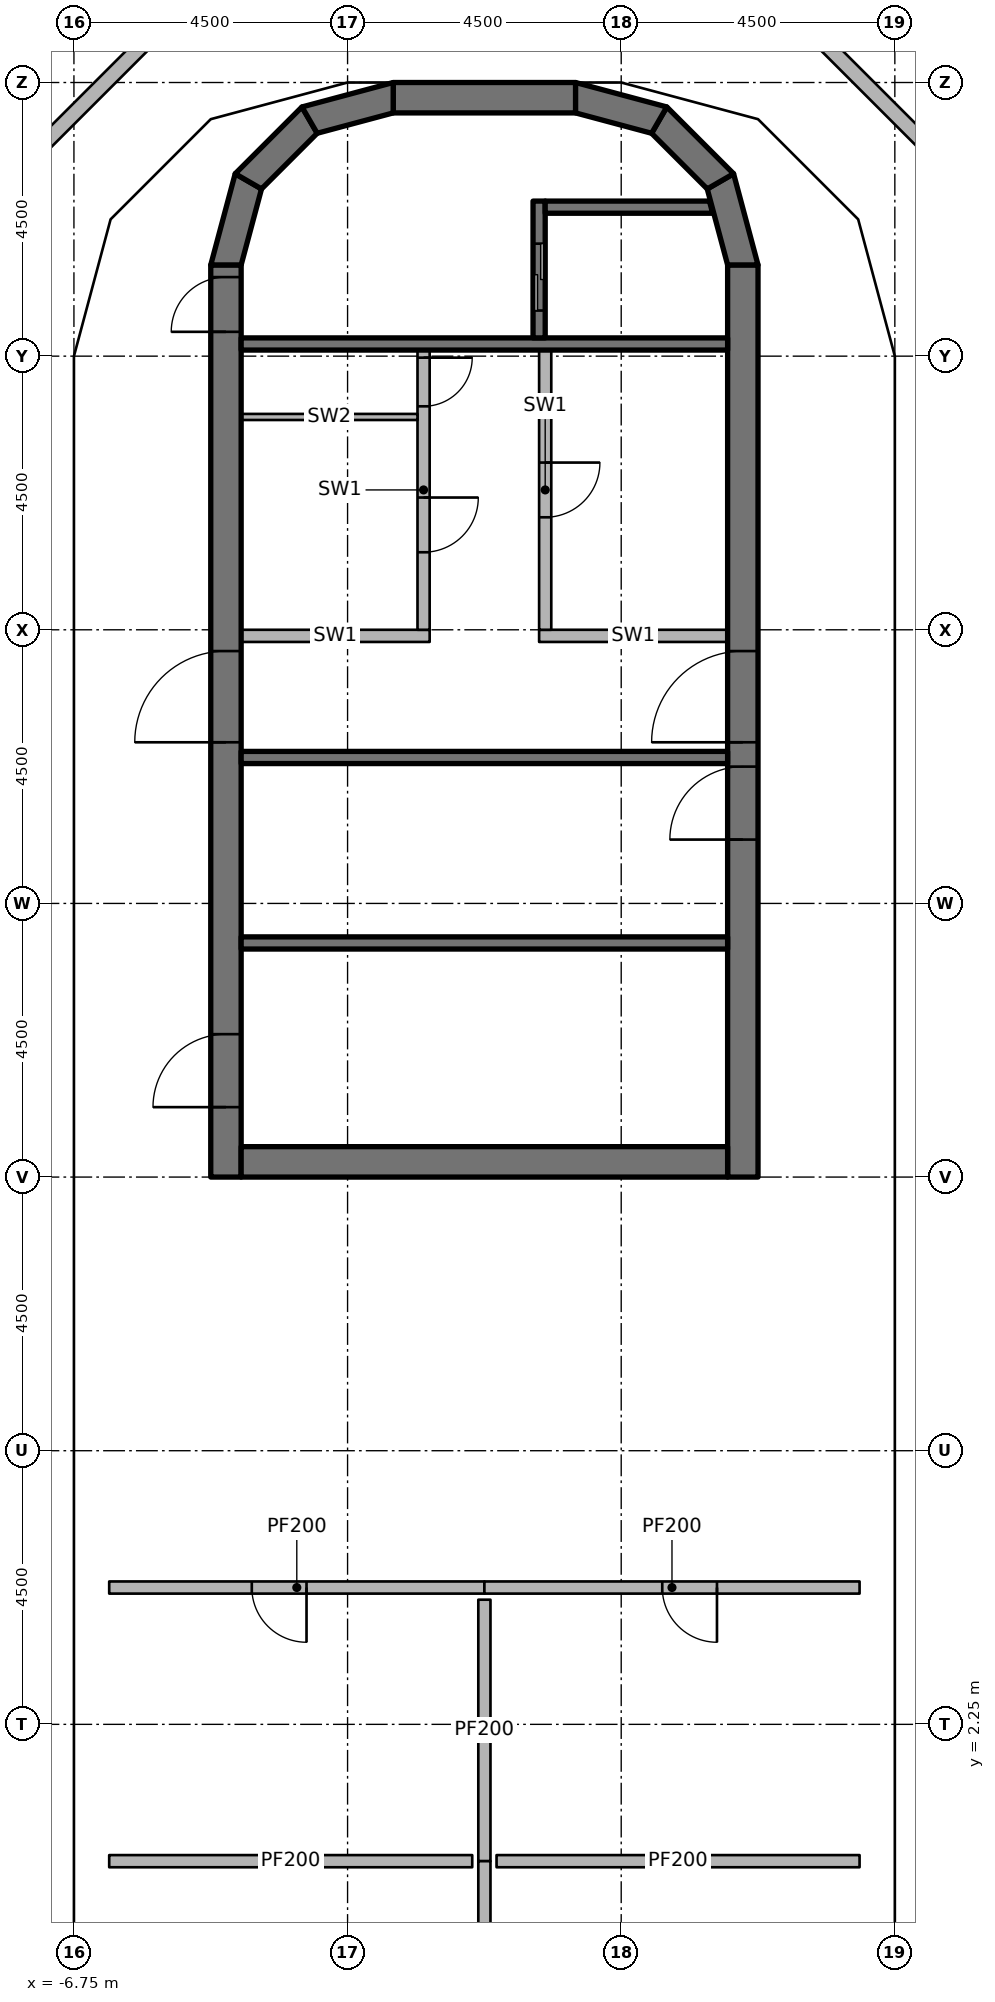
"""IFC4 building model, lengths in metres.
Left out: names, types, materials, properties, quantities, classifications, styles, units other than length and angle.
Written with IfcOpenShell. Run it as: python <this file> out.ifc"""

import sys

from ifc_helpers import new_model, si_unit, direction, frame, frame_2d, origin, origin_2d, place, context, subcontext, project, spatial, polyline, rectangle, outline, extrude, element, fill, save


model = new_model("IFC4")
c1 = context("Model", 3, precision=1e-05, world=origin(), true_north=direction((0.0, 1.0)))
c2 = subcontext(c1, "Body", "Model", "MODEL_VIEW")
j1 = project(units=[si_unit("LENGTHUNIT", "METRE"), si_unit("PLANEANGLEUNIT", "RADIAN")], contexts=[c1])
p1 = place(None, origin())
s1 = spatial("IfcSite", under=j1, at=p1, CompositionType="ELEMENT")
p2 = place(p1, origin())
s2 = spatial("IfcBuilding", under=s1, at=p2, CompositionType="ELEMENT")
p3 = place(p2, frame((0.0, 0.0, 309.6)))
s3 = spatial("IfcBuildingStorey", under=s2, at=p3, CompositionType="ELEMENT", Elevation=309.6)
for number, where, z_axis, x_axis in (
    (1, (-6.25, 6.25, 0.0), (0.0, 0.0, 1.0), (1.0, 0.0, 0.0)),
    (2, (-6.25, 10.75, 0.0), (0.0, 0.0, 1.0), (1.0, 0.0, 0.0)),
    (3, (-6.25, 15.75, 0.0), (0.0, 0.0, 1.0), (1.0, 0.0, 0.0)),
    (4, (-6.25, 20.25, 0.0), (0.0, 0.0, 1.0), (1.0, 0.0, 0.0)),
    (5, (-6.25, 24.65, 0.0), (0.0, 0.0, 1.0), (1.0, 0.0, 0.0)),
    (6, (6.25, 6.25, 0.0), (0.0, 0.0, 1.0), (1.0, 0.0, 0.0)),
    (7, (6.25, 10.75, 0.0), (0.0, 0.0, 1.0), (1.0, 0.0, 0.0)),
    (8, (6.25, 15.75, 0.0), (0.0, 0.0, 1.0), (1.0, 0.0, 0.0)),
    (9, (6.25, 20.25, 0.0), (0.0, 0.0, 1.0), (1.0, 0.0, 0.0)),
    (10, (6.25, 24.65, 0.0), (0.0, 0.0, 1.0), (1.0, 0.0, 0.0)),
):
    element("IfcColumn", number, at=place(p3, frame(where, z_axis=z_axis, x_axis=x_axis)), inside=s3, PredefinedType="COLUMN", context=c2, shape_type="SweptSolid", body=[
        extrude(rectangle(XDim=0.6, YDim=0.6, at=origin_2d()), origin(), (0.0, 0.0, 1.0), 3.45),
    ])
p4 = place(p3, frame((-4.25, 11.25, 0.0), z_axis=(0.0, 0.0, 1.0), x_axis=(0.0, 1.0, 0.0)))
e11 = element("IfcWall", 11, at=p4, inside=s3, PredefinedType="SHEAR", context=c2, shape_type="SweptSolid", body=[
    extrude(rectangle(XDim=15.0, YDim=0.5, at=frame_2d((7.5, 0.0))), origin(), (0.0, 0.0, 1.0), 3.6),
])
p5 = place(p4, frame((7.15, 0.0, 0.0)))
e12 = element("IfcOpeningElement", 12, at=p5, cuts=e11, PredefinedType="OPENING", context=c2, shape_type="SweptSolid", body=[
    extrude(rectangle(XDim=1.5, YDim=2.3, at=frame_2d((0.75, 1.15))), frame((0.0, 0.26, 0.0), z_axis=(0.0, -1.0, 0.0), x_axis=(1.0, 0.0, 0.0)), (0.0, 0.0, 1.0), 0.52),
])
p6 = place(p4, frame((13.9, 0.0, 0.0)))
e13 = element("IfcOpeningElement", 13, at=p6, cuts=e11, PredefinedType="OPENING", context=c2, shape_type="SweptSolid", body=[
    extrude(rectangle(XDim=0.9, YDim=2.1, at=frame_2d((0.45, 1.05))), frame((0.0, 0.26, 0.0), z_axis=(0.0, -1.0, 0.0), x_axis=(1.0, 0.0, 0.0)), (0.0, 0.0, 1.0), 0.52),
])
p7 = place(p4, frame((1.15, 0.0, 0.0)))
e14 = element("IfcOpeningElement", 14, at=p7, cuts=e11, PredefinedType="OPENING", context=c2, shape_type="SweptSolid", body=[
    extrude(rectangle(XDim=1.2, YDim=2.1, at=frame_2d((0.6, 1.05))), frame((0.0, 0.26, 0.0), z_axis=(0.0, -1.0, 0.0), x_axis=(1.0, 0.0, 0.0)), (0.0, 0.0, 1.0), 0.52),
])
p8 = place(p3, frame((4.25, 11.25, 0.0), z_axis=(0.0, 0.0, 1.0), x_axis=(0.0, 1.0, 0.0)))
e15 = element("IfcWall", 15, at=p8, inside=s3, PredefinedType="SHEAR", context=c2, shape_type="SweptSolid", body=[
    extrude(rectangle(XDim=15.0, YDim=0.5, at=frame_2d((7.5, 0.0))), origin(), (0.0, 0.0, 1.0), 3.6),
])
p9 = place(p8, frame((7.15, 0.0, 0.0)))
e16 = element("IfcOpeningElement", 16, at=p9, cuts=e15, PredefinedType="OPENING", context=c2, shape_type="SweptSolid", body=[
    extrude(rectangle(XDim=1.5, YDim=2.3, at=frame_2d((0.75, 1.15))), frame((0.0, 0.26, 0.0), z_axis=(0.0, -1.0, 0.0), x_axis=(1.0, 0.0, 0.0)), (0.0, 0.0, 1.0), 0.52),
])
p10 = place(p8, frame((5.55, 0.0, 0.0)))
e17 = element("IfcOpeningElement", 17, at=p10, cuts=e15, PredefinedType="OPENING", context=c2, shape_type="SweptSolid", body=[
    extrude(rectangle(XDim=1.2, YDim=2.1, at=frame_2d((0.6, 1.05))), frame((0.0, 0.26, 0.0), z_axis=(0.0, -1.0, 0.0), x_axis=(1.0, 0.0, 0.0)), (0.0, 0.0, 1.0), 0.52),
])
p11 = place(p3, frame((-4.0, 11.5, 0.0), z_axis=(0.0, 0.0, 1.0), x_axis=(1.0, 0.0, 0.0)))
e18 = element("IfcWall", 18, at=p11, inside=s3, PredefinedType="SHEAR", context=c2, shape_type="SweptSolid", body=[
    extrude(rectangle(XDim=8.0, YDim=0.5, at=frame_2d((4.0, 0.0))), origin(), (0.0, 0.0, 1.0), 3.6),
])
p12 = place(p3, frame((-1.5, 29.0, 0.0), z_axis=(0.0, 0.0, 1.0), x_axis=(1.0, 0.0, 0.0)))
e19 = element("IfcWall", 19, at=p12, inside=s3, PredefinedType="SHEAR", context=c2, shape_type="SweptSolid", body=[
    extrude(rectangle(XDim=3.0, YDim=0.5, at=frame_2d((1.5, 0.0))), origin(), (0.0, 0.0, 1.0), 3.6),
])
p13 = place(p3, origin())
e20 = element("IfcWall", 20, at=p13, inside=s3, PredefinedType="SHEAR", context=c2, shape_type="SweptSolid", body=[
    extrude(outline(polyline([(-4.5, 26.25), (-4.098, 27.75), (-3.665, 27.5), (-4.0, 26.25), (-4.5, 26.25)])), origin(), (0.0, 0.0, 1.0), 3.6),
])
p14 = place(p3, origin())
e21 = element("IfcWall", 21, at=p14, inside=s3, PredefinedType="SHEAR", context=c2, shape_type="SweptSolid", body=[
    extrude(outline(polyline([(-4.098, 27.75), (-3.0, 28.848), (-2.75, 28.415), (-3.665, 27.5), (-4.098, 27.75)])), origin(), (0.0, 0.0, 1.0), 3.6),
])
p15 = place(p3, origin())
e22 = element("IfcWall", 22, at=p15, inside=s3, PredefinedType="SHEAR", context=c2, shape_type="SweptSolid", body=[
    extrude(outline(polyline([(-3.0, 28.848), (-1.5, 29.25), (-1.5, 28.75), (-2.75, 28.415), (-3.0, 28.848)])), origin(), (0.0, 0.0, 1.0), 3.6),
])
p16 = place(p3, origin())
e23 = element("IfcWall", 23, at=p16, inside=s3, PredefinedType="SHEAR", context=c2, shape_type="SweptSolid", body=[
    extrude(outline(polyline([(4.5, 26.25), (4.098, 27.75), (3.665, 27.5), (4.0, 26.25), (4.5, 26.25)])), origin(), (0.0, 0.0, 1.0), 3.6),
])
p17 = place(p3, origin())
e24 = element("IfcWall", 24, at=p17, inside=s3, PredefinedType="SHEAR", context=c2, shape_type="SweptSolid", body=[
    extrude(outline(polyline([(4.098, 27.75), (3.0, 28.848), (2.75, 28.415), (3.665, 27.5), (4.098, 27.75)])), origin(), (0.0, 0.0, 1.0), 3.6),
])
p18 = place(p3, origin())
e25 = element("IfcWall", 25, at=p18, inside=s3, PredefinedType="SHEAR", context=c2, shape_type="SweptSolid", body=[
    extrude(outline(polyline([(3.0, 28.848), (1.5, 29.25), (1.5, 28.75), (2.75, 28.415), (3.0, 28.848)])), origin(), (0.0, 0.0, 1.0), 3.6),
])
p19 = place(p3, origin())
e26 = element("IfcWall", 26, at=p19, inside=s3, PredefinedType="PARAPET", context=c2, shape_type="SweptSolid", body=[
    extrude(outline(polyline([(-7.743, 27.921), (-5.421, 30.243), (-5.292, 30.019), (-7.519, 27.792), (-7.743, 27.921)])), origin(), (0.0, 0.0, 1.0), 1.22),
])
p20 = place(p3, origin())
e27 = element("IfcWall", 27, at=p20, inside=s3, PredefinedType="PARAPET", context=c2, shape_type="SweptSolid", body=[
    extrude(outline(polyline([(5.421, 30.243), (7.743, 27.921), (7.519, 27.792), (5.292, 30.019), (5.421, 30.243)])), origin(), (0.0, 0.0, 1.0), 1.22),
])
p21 = place(p3, frame((-4.0, 24.95, 0.0), z_axis=(0.0, 0.0, 1.0), x_axis=(1.0, 0.0, 0.0)))
e28 = element("IfcWall", 28, at=p21, inside=s3, PredefinedType="SHEAR", context=c2, shape_type="SweptSolid", body=[
    extrude(rectangle(XDim=8.0, YDim=0.2, at=frame_2d((4.0, 0.0))), origin(), (0.0, 0.0, 1.0), 3.45),
])
p22 = place(p3, frame((0.9, 27.3, 0.0), z_axis=(0.0, 0.0, 1.0), x_axis=(0.0, -1.0, 0.0)))
e29 = element("IfcWall", 29, at=p22, inside=s3, PredefinedType="SHEAR", context=c2, shape_type="SweptSolid", body=[
    extrude(rectangle(XDim=2.25, YDim=0.2, at=frame_2d((1.125, 0.0))), origin(), (0.0, 0.0, 1.0), 3.45),
])
p23 = place(p22, frame((0.7, 0.0, 0.0)))
e30 = element("IfcOpeningElement", 30, at=p23, cuts=e29, PredefinedType="OPENING", context=c2, shape_type="SweptSolid", body=[
    extrude(rectangle(XDim=1.1, YDim=2.3, at=frame_2d((0.55, 1.15))), frame((0.0, 0.11, 0.0), z_axis=(0.0, -1.0, 0.0), x_axis=(1.0, 0.0, 0.0)), (0.0, 0.0, 1.0), 0.22),
])
p24 = place(p3, origin())
e31 = element("IfcWall", 31, at=p24, inside=s3, PredefinedType="SHEAR", context=c2, shape_type="SweptSolid", body=[
    extrude(outline(polyline([(1.0, 27.1), (3.755, 27.1), (3.701, 27.3), (1.0, 27.3), (1.0, 27.1)])), origin(), (0.0, 0.0, 1.0), 3.45),
])
for number, where, z_axis, x_axis in (
    (32, (-4.0, 18.15, 0.0), (0.0, 0.0, 1.0), (1.0, 0.0, 0.0)),
    (33, (-4.0, 15.1, 0.0), (0.0, 0.0, 1.0), (1.0, 0.0, 0.0)),
):
    element("IfcWall", number, at=place(p3, frame(where, z_axis=z_axis, x_axis=x_axis)), inside=s3, PredefinedType="SHEAR", context=c2, shape_type="SweptSolid", body=[
        extrude(rectangle(XDim=8.0, YDim=0.2, at=frame_2d((4.0, 0.0))), origin(), (0.0, 0.0, 1.0), 3.45),
    ])
p25 = place(p3, frame((-4.0, 20.15, 0.0), z_axis=(0.0, 0.0, 1.0), x_axis=(1.0, 0.0, 0.0)))
e34 = element("IfcWall", 34, at=p25, inside=s3, PredefinedType="PARTITIONING", context=c2, shape_type="SweptSolid", body=[
    extrude(rectangle(XDim=3.1, YDim=0.2, at=frame_2d((1.55, 0.0))), origin(), (0.0, 0.0, 1.0), 3.45),
])
p26 = place(p3, frame((-1.0, 24.85, 0.0), z_axis=(0.0, 0.0, 1.0), x_axis=(0.0, -1.0, 0.0)))
e35 = element("IfcWall", 35, at=p26, inside=s3, PredefinedType="PARTITIONING", context=c2, shape_type="SweptSolid", body=[
    extrude(rectangle(XDim=4.6, YDim=0.2, at=frame_2d((2.3, 0.0))), origin(), (0.0, 0.0, 1.0), 3.45),
])
p27 = place(p26, frame((0.125, 0.0, 0.0)))
e36 = element("IfcOpeningElement", 36, at=p27, cuts=e35, PredefinedType="OPENING", context=c2, shape_type="SweptSolid", body=[
    extrude(rectangle(XDim=0.8, YDim=2.1, at=frame_2d((0.4, 1.05))), frame((0.0, 0.11, 0.0), z_axis=(0.0, -1.0, 0.0), x_axis=(1.0, 0.0, 0.0)), (0.0, 0.0, 1.0), 0.22),
])
p28 = place(p26, frame((2.425, 0.0, 0.0)))
e37 = element("IfcOpeningElement", 37, at=p28, cuts=e35, PredefinedType="OPENING", context=c2, shape_type="SweptSolid", body=[
    extrude(rectangle(XDim=0.9, YDim=2.1, at=frame_2d((0.45, 1.05))), frame((0.0, 0.11, 0.0), z_axis=(0.0, -1.0, 0.0), x_axis=(1.0, 0.0, 0.0)), (0.0, 0.0, 1.0), 0.22),
])
p29 = place(p3, frame((0.9, 20.15, 0.0), z_axis=(0.0, 0.0, 1.0), x_axis=(1.0, 0.0, 0.0)))
e38 = element("IfcWall", 38, at=p29, inside=s3, PredefinedType="PARTITIONING", context=c2, shape_type="SweptSolid", body=[
    extrude(rectangle(XDim=3.1, YDim=0.2, at=frame_2d((1.55, 0.0))), origin(), (0.0, 0.0, 1.0), 3.45),
])
p30 = place(p3, frame((1.0, 24.85, 0.0), z_axis=(0.0, 0.0, 1.0), x_axis=(0.0, -1.0, 0.0)))
e39 = element("IfcWall", 39, at=p30, inside=s3, PredefinedType="PARTITIONING", context=c2, shape_type="SweptSolid", body=[
    extrude(rectangle(XDim=4.6, YDim=0.2, at=frame_2d((2.3, 0.0))), origin(), (0.0, 0.0, 1.0), 3.45),
])
p31 = place(p30, frame((1.85, 0.0, 0.0)))
e40 = element("IfcOpeningElement", 40, at=p31, cuts=e39, PredefinedType="OPENING", context=c2, shape_type="SweptSolid", body=[
    extrude(rectangle(XDim=0.9, YDim=2.1, at=frame_2d((0.45, 1.05))), frame((0.0, 0.11, 0.0), z_axis=(0.0, -1.0, 0.0), x_axis=(1.0, 0.0, 0.0)), (0.0, 0.0, 1.0), 0.22),
])
p32 = place(p3, frame((-4.0, 23.75, 0.0), z_axis=(0.0, 0.0, 1.0), x_axis=(1.0, 0.0, 0.0)))
e41 = element("IfcWall", 41, at=p32, inside=s3, PredefinedType="PARTITIONING", context=c2, shape_type="SweptSolid", body=[
    extrude(rectangle(XDim=2.9, YDim=0.1, at=frame_2d((1.45, 0.0))), origin(), (0.0, 0.0, 1.0), 3.45),
])
p33 = place(p3, frame((0.0, 4.5, 0.0), z_axis=(0.0, 0.0, 1.0), x_axis=(-1.0, 0.0, 0.0)))
e42 = element("IfcWall", 42, at=p33, inside=s3, PredefinedType="PARTITIONING", context=c2, shape_type="SweptSolid", body=[
    extrude(rectangle(XDim=6.17, YDim=0.2, at=frame_2d((3.085, 0.0))), origin(), (0.0, 0.0, 1.0), 2.51),
])
p34 = place(p33, frame((2.925, 0.0, 0.0)))
e43 = element("IfcOpeningElement", 43, at=p34, cuts=e42, PredefinedType="OPENING", context=c2, shape_type="SweptSolid", body=[
    extrude(rectangle(XDim=0.9, YDim=2.1, at=frame_2d((0.45, 1.05))), frame((0.0, 0.11, 0.0), z_axis=(0.0, -1.0, 0.0), x_axis=(1.0, 0.0, 0.0)), (0.0, 0.0, 1.0), 0.22),
])
p35 = place(p3, frame((6.17, 4.5, 0.0), z_axis=(0.0, 0.0, 1.0), x_axis=(-1.0, 0.0, 0.0)))
e44 = element("IfcWall", 44, at=p35, inside=s3, PredefinedType="PARTITIONING", context=c2, shape_type="SweptSolid", body=[
    extrude(rectangle(XDim=6.17, YDim=0.2, at=frame_2d((3.085, 0.0))), origin(), (0.0, 0.0, 1.0), 2.51),
])
p36 = place(p35, frame((2.345, 0.0, 0.0)))
e45 = element("IfcOpeningElement", 45, at=p36, cuts=e44, PredefinedType="OPENING", context=c2, shape_type="SweptSolid", body=[
    extrude(rectangle(XDim=0.9, YDim=2.1, at=frame_2d((0.45, 1.05))), frame((0.0, 0.11, 0.0), z_axis=(0.0, -1.0, 0.0), x_axis=(1.0, 0.0, 0.0)), (0.0, 0.0, 1.0), 0.22),
])
p37 = place(p3, frame((0.0, 4.3, 0.0), z_axis=(0.0, 0.0, 1.0), x_axis=(0.0, -1.0, 0.0)))
e46 = element("IfcWall", 46, at=p37, inside=s3, PredefinedType="PARTITIONING", context=c2, shape_type="SweptSolid", body=[
    extrude(rectangle(XDim=4.3, YDim=0.2, at=frame_2d((2.15, 0.0))), origin(), (0.0, 0.0, 1.0), 2.828),
])
for number, where, z_axis, x_axis in (
    (47, (-0.2, 0.0, 0.0), (0.0, 0.0, 1.0), (-1.0, 0.0, 0.0)),
    (48, (6.17, 0.0, 0.0), (0.0, 0.0, 1.0), (-1.0, 0.0, 0.0)),
):
    element("IfcWall", number, at=place(p3, frame(where, z_axis=z_axis, x_axis=x_axis)), inside=s3, PredefinedType="PARTITIONING", context=c2, shape_type="SweptSolid", body=[
        extrude(rectangle(XDim=5.97, YDim=0.2, at=frame_2d((2.985, 0.0))), origin(), (0.0, 0.0, 1.0), 2.51),
    ])
p38 = place(p3, frame((0.0, 0.0, 0.0), z_axis=(0.0, 0.0, 1.0), x_axis=(0.0, -1.0, 0.0)))
e49 = element("IfcWall", 49, at=p38, inside=s3, PredefinedType="PARTITIONING", context=c2, shape_type="SweptSolid", body=[
    extrude(rectangle(XDim=4.3, YDim=0.2, at=frame_2d((2.15, 0.0))), origin(), (0.0, 0.0, 1.0), 2.828),
])
p39 = place(p5, origin())
e50 = element("IfcDoor", 50, at=p39, inside=s3, OperationType="DOUBLE_DOOR_SINGLE_SWING", PredefinedType="DOOR", context=c2, shape_type="SweptSolid", body=[
    extrude(rectangle(XDim=1.5, YDim=2.3, at=frame_2d((0.75, 1.15))), frame((0.0, 0.025, 0.0), z_axis=(0.0, -1.0, 0.0), x_axis=(1.0, 0.0, 0.0)), (0.0, 0.0, 1.0), 0.05),
])
fill(e12, e50)
p40 = place(p9, origin())
e51 = element("IfcDoor", 51, at=p40, inside=s3, OperationType="DOUBLE_DOOR_SINGLE_SWING", PredefinedType="DOOR", context=c2, shape_type="SweptSolid", body=[
    extrude(rectangle(XDim=1.5, YDim=2.3, at=frame_2d((0.75, 1.15))), frame((0.0, 0.025, 0.0), z_axis=(0.0, -1.0, 0.0), x_axis=(1.0, 0.0, 0.0)), (0.0, 0.0, 1.0), 0.05),
])
fill(e16, e51)
p41 = place(p6, origin())
e52 = element("IfcDoor", 52, at=p41, inside=s3, OperationType="SINGLE_SWING_RIGHT", PredefinedType="DOOR", context=c2, shape_type="SweptSolid", body=[
    extrude(rectangle(XDim=0.9, YDim=2.1, at=frame_2d((0.45, 1.05))), frame((0.0, 0.025, 0.0), z_axis=(0.0, -1.0, 0.0), x_axis=(1.0, 0.0, 0.0)), (0.0, 0.0, 1.0), 0.05),
])
fill(e13, e52)
p42 = place(p10, origin())
e53 = element("IfcDoor", 53, at=p42, inside=s3, OperationType="SINGLE_SWING_RIGHT", PredefinedType="DOOR", context=c2, shape_type="SweptSolid", body=[
    extrude(rectangle(XDim=1.2, YDim=2.1, at=frame_2d((0.6, 1.05))), frame((0.0, 0.025, 0.0), z_axis=(0.0, -1.0, 0.0), x_axis=(1.0, 0.0, 0.0)), (0.0, 0.0, 1.0), 0.05),
])
fill(e17, e53)
p43 = place(p7, origin())
e54 = element("IfcDoor", 54, at=p43, inside=s3, OperationType="SINGLE_SWING_RIGHT", PredefinedType="DOOR", context=c2, shape_type="SweptSolid", body=[
    extrude(rectangle(XDim=1.2, YDim=2.1, at=frame_2d((0.6, 1.05))), frame((0.0, 0.025, 0.0), z_axis=(0.0, -1.0, 0.0), x_axis=(1.0, 0.0, 0.0)), (0.0, 0.0, 1.0), 0.05),
])
fill(e14, e54)
p44 = place(p23, origin())
e55 = element("IfcDoor", 55, at=p44, inside=s3, OperationType="DOUBLE_DOOR_SLIDING", PredefinedType="DOOR", context=c2, shape_type="SweptSolid", body=[
    extrude(rectangle(XDim=1.1, YDim=2.3, at=frame_2d((0.55, 1.15))), frame((0.0, 0.025, 0.0), z_axis=(0.0, -1.0, 0.0), x_axis=(1.0, 0.0, 0.0)), (0.0, 0.0, 1.0), 0.05),
])
fill(e30, e55)
p45 = place(p27, origin())
e56 = element("IfcDoor", 56, at=p45, inside=s3, OperationType="SINGLE_SWING_LEFT", PredefinedType="DOOR", context=c2, shape_type="SweptSolid", body=[
    extrude(rectangle(XDim=0.8, YDim=2.1, at=frame_2d((0.4, 1.05))), frame((0.0, 0.025, 0.0), z_axis=(0.0, -1.0, 0.0), x_axis=(1.0, 0.0, 0.0)), (0.0, 0.0, 1.0), 0.05),
])
fill(e36, e56)
p46 = place(p28, origin())
e57 = element("IfcDoor", 57, at=p46, inside=s3, OperationType="SINGLE_SWING_RIGHT", PredefinedType="DOOR", context=c2, shape_type="SweptSolid", body=[
    extrude(rectangle(XDim=0.9, YDim=2.1, at=frame_2d((0.45, 1.05))), frame((0.0, 0.025, 0.0), z_axis=(0.0, -1.0, 0.0), x_axis=(1.0, 0.0, 0.0)), (0.0, 0.0, 1.0), 0.05),
])
fill(e37, e57)
p47 = place(p31, origin())
e58 = element("IfcDoor", 58, at=p47, inside=s3, OperationType="SINGLE_SWING_LEFT", PredefinedType="DOOR", context=c2, shape_type="SweptSolid", body=[
    extrude(rectangle(XDim=0.9, YDim=2.1, at=frame_2d((0.45, 1.05))), frame((0.0, 0.025, 0.0), z_axis=(0.0, -1.0, 0.0), x_axis=(1.0, 0.0, 0.0)), (0.0, 0.0, 1.0), 0.05),
])
fill(e40, e58)
p48 = place(p34, origin())
e59 = element("IfcDoor", 59, at=p48, inside=s3, OperationType="SINGLE_SWING_LEFT", PredefinedType="DOOR", context=c2, shape_type="SweptSolid", body=[
    extrude(rectangle(XDim=0.9, YDim=2.1, at=frame_2d((0.45, 1.05))), frame((0.0, 0.025, 0.0), z_axis=(0.0, -1.0, 0.0), x_axis=(1.0, 0.0, 0.0)), (0.0, 0.0, 1.0), 0.05),
])
fill(e43, e59)
p49 = place(p36, origin())
e60 = element("IfcDoor", 60, at=p49, inside=s3, OperationType="SINGLE_SWING_LEFT", PredefinedType="DOOR", context=c2, shape_type="SweptSolid", body=[
    extrude(rectangle(XDim=0.9, YDim=2.1, at=frame_2d((0.45, 1.05))), frame((0.0, 0.025, 0.0), z_axis=(0.0, -1.0, 0.0), x_axis=(1.0, 0.0, 0.0)), (0.0, 0.0, 1.0), 0.05),
])
fill(e45, e60)
save(model, sys.argv[1])
